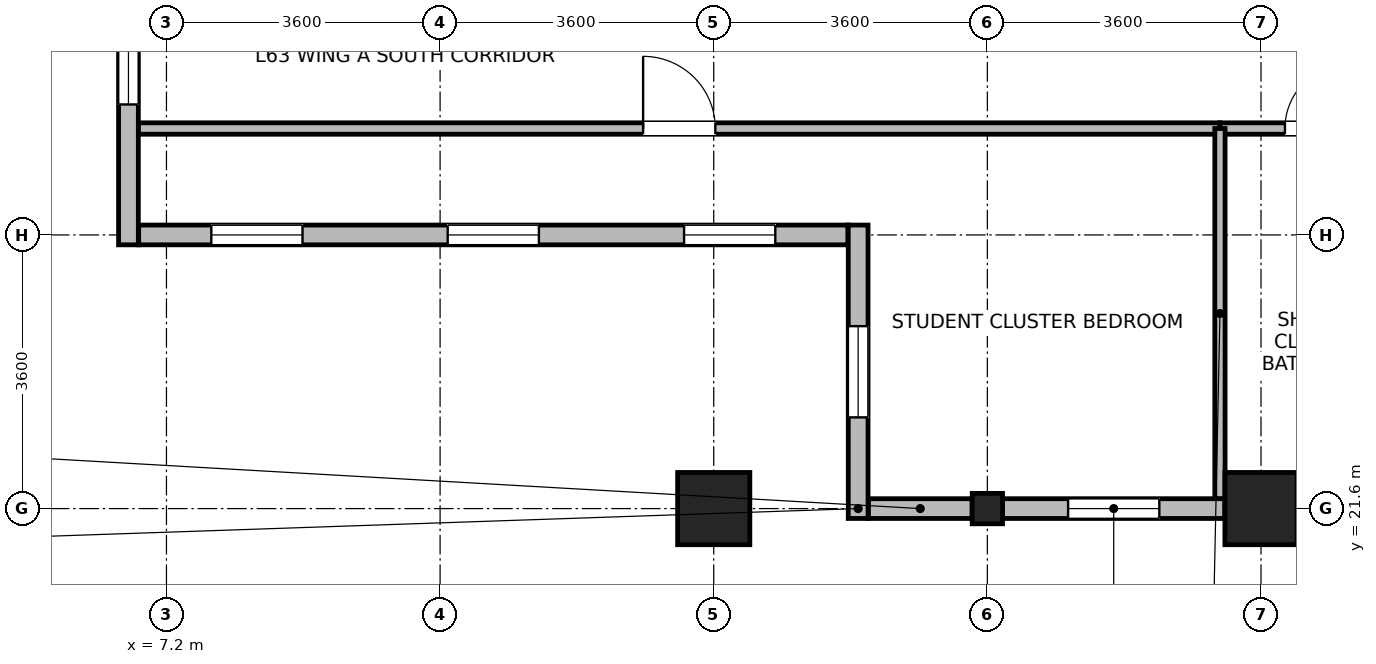
"""IFC4 building model, lengths in metres.
Left out: names, types, materials, properties, quantities, classifications, styles, units other than length and angle.
Written with IfcOpenShell. Run it as: python <this file> out.ifc"""

import sys

from ifc_helpers import new_model, si_unit, direction, frame, frame_2d, origin, origin_2d, place, context, subcontext, project, spatial, rectangle, i_section, extrude, source, transform, mapped, element, fill, save


model = new_model("IFC4")
c1 = context("Model", 3, precision=1e-05, world=origin(), true_north=direction((0.0, 1.0)))
c2 = subcontext(c1, "Body", "Model", "MODEL_VIEW")
j1 = project(units=[si_unit("LENGTHUNIT", "METRE"), si_unit("PLANEANGLEUNIT", "RADIAN")], contexts=[c1])
p1 = place(None, origin())
s1 = spatial("IfcSite", under=j1, at=p1, CompositionType="ELEMENT")
p2 = place(p1, origin())
s2 = spatial("IfcBuilding", under=s1, at=p2, CompositionType="ELEMENT")
p3 = place(p2, frame((0.0, 0.0, 246.2)))
s3 = spatial("IfcBuildingStorey", under=s2, at=p3, CompositionType="ELEMENT", Elevation=246.2)
m1 = source(origin(), c2, "Body", "SweptSolid", [
    extrude(rectangle(XDim=0.95, YDim=0.95, at=origin_2d()), origin(), (0.0, 0.0, 1.0), 3.7),
])
for number, where, z_axis, x_axis in (
    (1, (14.4, 21.6, 0.0), (0.0, 0.0, 1.0), (1.0, 0.0, 0.0)),
    (2, (21.6, 21.6, 0.0), (0.0, 0.0, 1.0), (1.0, 0.0, 0.0)),
):
    element("IfcColumn", number, at=place(p3, frame(where, z_axis=z_axis, x_axis=x_axis)), inside=s3, PredefinedType="COLUMN", context=c2, shape_type="MappedRepresentation", body=[
        mapped(m1, transform((0.0, 0.0, 0.0), x_axis=(1.0, 0.0, 0.0), y_axis=(0.0, 1.0, 0.0), z_axis=(0.0, 0.0, 1.0), scale=1.0)),
    ])
m2 = source(origin(), c2, "Body", "SweptSolid", [
    extrude(i_section(OverallWidth=0.399, OverallDepth=0.4, WebThickness=0.017, FlangeThickness=0.023, FilletRadius=0.015, at=origin_2d()), origin(), (0.0, 0.0, 1.0), 3.7),
])
p4 = place(p3, frame((18.0, 21.6, 0.0), z_axis=(0.0, 0.0, 1.0), x_axis=(1.0, 0.0, 0.0)))
e3 = element("IfcColumn", 3, at=p4, inside=s3, PredefinedType="COLUMN", context=c2, shape_type="MappedRepresentation", body=[
    mapped(m2, transform((0.0, 0.0, 0.0), x_axis=(1.0, 0.0, 0.0), y_axis=(0.0, 1.0, 0.0), z_axis=(0.0, 0.0, 1.0), scale=1.0)),
])
p5 = place(p3, frame((17.8, 21.6, 0.0), z_axis=(0.0, 0.0, 1.0), x_axis=(-1.0, 0.0, 0.0)))
e4 = element("IfcWall", 4, at=p5, inside=s3, PredefinedType="STANDARD", context=c2, shape_type="SweptSolid", body=[
    extrude(rectangle(XDim=1.365, YDim=0.26, at=frame_2d((0.682, 0.0))), origin(), (0.0, 0.0, 1.0), 2.86),
])
p6 = place(p3, frame((21.124, 21.6, 0.0), z_axis=(0.0, 0.0, 1.0), x_axis=(-1.0, 0.0, 0.0)))
e5 = element("IfcWall", 5, at=p6, inside=s3, PredefinedType="STANDARD", context=c2, shape_type="SweptSolid", body=[
    extrude(rectangle(XDim=2.924, YDim=0.26, at=frame_2d((1.462, 0.0))), origin(), (0.0, 0.0, 1.0), 2.86),
])
p7 = place(p6, frame((0.862, 0.0, 0.85)))
e6 = element("IfcOpeningElement", 6, at=p7, cuts=e5, PredefinedType="OPENING", context=c2, shape_type="SweptSolid", body=[
    extrude(rectangle(XDim=1.2, YDim=1.75, at=frame_2d((0.6, 0.875))), frame((0.0, 0.14, 0.0), z_axis=(0.0, -1.0, 0.0), x_axis=(1.0, 0.0, 0.0)), (0.0, 0.0, 1.0), 0.28),
])
p8 = place(p3, frame((6.7, 25.07, 0.0), z_axis=(0.0, 0.0, 1.0), x_axis=(0.0, 1.0, 0.0)))
e7 = element("IfcWall", 7, at=p8, inside=s3, PredefinedType="STANDARD", context=c2, shape_type="SweptSolid", body=[
    extrude(rectangle(XDim=3.104, YDim=0.26, at=frame_2d((1.552, 0.0))), origin(), (0.0, 0.0, 1.0), 3.26),
])
p9 = place(p8, frame((1.847, 0.0, 0.85)))
e8 = element("IfcOpeningElement", 8, at=p9, cuts=e7, PredefinedType="OPENING", context=c2, shape_type="SweptSolid", body=[
    extrude(rectangle(XDim=0.95, YDim=1.75, at=frame_2d((0.475, 0.875))), frame((0.0, 0.14, 0.0), z_axis=(0.0, -1.0, 0.0), x_axis=(1.0, 0.0, 0.0)), (0.0, 0.0, 1.0), 0.28),
])
p10 = place(p3, frame((16.165, 25.2, 0.0), z_axis=(0.0, 0.0, 1.0), x_axis=(-1.0, 0.0, 0.0)))
e9 = element("IfcWall", 9, at=p10, inside=s3, PredefinedType="STANDARD", context=c2, shape_type="SweptSolid", body=[
    extrude(rectangle(XDim=9.33, YDim=0.26, at=frame_2d((4.665, 0.0))), origin(), (0.0, 0.0, 1.0), 3.26),
])
p11 = place(p10, frame((0.955, 0.0, 0.85)))
e10 = element("IfcOpeningElement", 10, at=p11, cuts=e9, PredefinedType="OPENING", context=c2, shape_type="SweptSolid", body=[
    extrude(rectangle(XDim=1.2, YDim=1.75, at=frame_2d((0.6, 0.875))), frame((0.0, 0.14, 0.0), z_axis=(0.0, -1.0, 0.0), x_axis=(1.0, 0.0, 0.0)), (0.0, 0.0, 1.0), 0.28),
])
p12 = place(p10, frame((4.065, 0.0, 0.85)))
e11 = element("IfcOpeningElement", 11, at=p12, cuts=e9, PredefinedType="OPENING", context=c2, shape_type="SweptSolid", body=[
    extrude(rectangle(XDim=1.2, YDim=1.75, at=frame_2d((0.6, 0.875))), frame((0.0, 0.14, 0.0), z_axis=(0.0, -1.0, 0.0), x_axis=(1.0, 0.0, 0.0)), (0.0, 0.0, 1.0), 0.28),
])
p13 = place(p10, frame((7.175, 0.0, 0.85)))
e12 = element("IfcOpeningElement", 12, at=p13, cuts=e9, PredefinedType="OPENING", context=c2, shape_type="SweptSolid", body=[
    extrude(rectangle(XDim=1.2, YDim=1.75, at=frame_2d((0.6, 0.875))), frame((0.0, 0.14, 0.0), z_axis=(0.0, -1.0, 0.0), x_axis=(1.0, 0.0, 0.0)), (0.0, 0.0, 1.0), 0.28),
])
p14 = place(p3, frame((16.3, 21.47, 0.0), z_axis=(0.0, 0.0, 1.0), x_axis=(0.0, 1.0, 0.0)))
e13 = element("IfcWall", 13, at=p14, inside=s3, PredefinedType="STANDARD", context=c2, shape_type="SweptSolid", body=[
    extrude(rectangle(XDim=3.86, YDim=0.26, at=frame_2d((1.93, 0.0))), origin(), (0.0, 0.0, 1.0), 3.26),
])
p15 = place(p14, frame((1.33, 0.0, 0.85)))
e14 = element("IfcOpeningElement", 14, at=p15, cuts=e13, PredefinedType="OPENING", context=c2, shape_type="SweptSolid", body=[
    extrude(rectangle(XDim=1.2, YDim=1.75, at=frame_2d((0.6, 0.875))), frame((0.0, 0.14, 0.0), z_axis=(0.0, -1.0, 0.0), x_axis=(1.0, 0.0, 0.0)), (0.0, 0.0, 1.0), 0.28),
])
p16 = place(p3, frame((6.832, 26.6, 0.0), z_axis=(0.0, 0.0, 1.0), x_axis=(1.0, 0.0, 0.0)))
e15 = element("IfcWall", 15, at=p16, inside=s3, PredefinedType="PARTITIONING", context=c2, shape_type="SweptSolid", body=[
    extrude(rectangle(XDim=14.228, YDim=0.15, at=frame_2d((7.114, 0.0))), origin(), (0.0, 0.0, 1.0), 3.26),
])
p17 = place(p16, frame((6.639, 0.0, 0.0)))
e16 = element("IfcOpeningElement", 16, at=p17, cuts=e15, PredefinedType="OPENING", context=c2, shape_type="SweptSolid", body=[
    extrude(rectangle(XDim=0.95, YDim=2.1, at=frame_2d((0.475, 1.05))), frame((0.0, 0.085, 0.0), z_axis=(0.0, -1.0, 0.0), x_axis=(1.0, 0.0, 0.0)), (0.0, 0.0, 1.0), 0.17),
])
p18 = place(p3, frame((21.06, 26.6, 0.0), z_axis=(0.0, 0.0, 1.0), x_axis=(1.0, 0.0, 0.0)))
e17 = element("IfcWall", 17, at=p18, inside=s3, PredefinedType="PARTITIONING", context=c2, shape_type="SweptSolid", body=[
    extrude(rectangle(XDim=2.56, YDim=0.15, at=frame_2d((1.28, 0.0))), origin(), (0.0, 0.0, 1.0), 3.26),
])
p19 = place(p18, frame((0.855, 0.0, 0.0)))
e18 = element("IfcOpeningElement", 18, at=p19, cuts=e17, PredefinedType="OPENING", context=c2, shape_type="SweptSolid", body=[
    extrude(rectangle(XDim=0.85, YDim=2.04, at=frame_2d((0.425, 1.02))), frame((0.0, 0.085, 0.0), z_axis=(0.0, -1.0, 0.0), x_axis=(1.0, 0.0, 0.0)), (0.0, 0.0, 1.0), 0.17),
])
p20 = place(p3, frame((21.06, 21.732, 0.0), z_axis=(0.0, 0.0, 1.0), x_axis=(0.0, 1.0, 0.0)))
e19 = element("IfcWall", 19, at=p20, inside=s3, PredefinedType="PARTITIONING", context=c2, shape_type="SweptSolid", body=[
    extrude(rectangle(XDim=4.868, YDim=0.135, at=frame_2d((2.434, 0.0))), origin(), (0.0, 0.0, 1.0), 3.26),
])
p21 = place(p7, origin())
e20 = element("IfcWindow", 20, at=p21, inside=s3, PartitioningType="SINGLE_PANEL", PredefinedType="WINDOW", context=c2, shape_type="SweptSolid", body=[
    extrude(rectangle(XDim=1.2, YDim=1.75, at=frame_2d((0.6, 0.875))), frame((0.0, 0.03, 0.0), z_axis=(0.0, -1.0, 0.0), x_axis=(1.0, 0.0, 0.0)), (0.0, 0.0, 1.0), 0.06),
])
fill(e6, e20)
p22 = place(p9, origin())
e21 = element("IfcWindow", 21, at=p22, inside=s3, PartitioningType="SINGLE_PANEL", PredefinedType="WINDOW", context=c2, shape_type="SweptSolid", body=[
    extrude(rectangle(XDim=0.95, YDim=1.75, at=frame_2d((0.475, 0.875))), frame((0.0, 0.03, 0.0), z_axis=(0.0, -1.0, 0.0), x_axis=(1.0, 0.0, 0.0)), (0.0, 0.0, 1.0), 0.06),
])
fill(e8, e21)
p23 = place(p11, origin())
e22 = element("IfcWindow", 22, at=p23, inside=s3, PartitioningType="SINGLE_PANEL", PredefinedType="WINDOW", context=c2, shape_type="SweptSolid", body=[
    extrude(rectangle(XDim=1.2, YDim=1.75, at=frame_2d((0.6, 0.875))), frame((0.0, 0.03, 0.0), z_axis=(0.0, -1.0, 0.0), x_axis=(1.0, 0.0, 0.0)), (0.0, 0.0, 1.0), 0.06),
])
fill(e10, e22)
p24 = place(p12, origin())
e23 = element("IfcWindow", 23, at=p24, inside=s3, PartitioningType="SINGLE_PANEL", PredefinedType="WINDOW", context=c2, shape_type="SweptSolid", body=[
    extrude(rectangle(XDim=1.2, YDim=1.75, at=frame_2d((0.6, 0.875))), frame((0.0, 0.03, 0.0), z_axis=(0.0, -1.0, 0.0), x_axis=(1.0, 0.0, 0.0)), (0.0, 0.0, 1.0), 0.06),
])
fill(e11, e23)
p25 = place(p13, origin())
e24 = element("IfcWindow", 24, at=p25, inside=s3, PartitioningType="SINGLE_PANEL", PredefinedType="WINDOW", context=c2, shape_type="SweptSolid", body=[
    extrude(rectangle(XDim=1.2, YDim=1.75, at=frame_2d((0.6, 0.875))), frame((0.0, 0.03, 0.0), z_axis=(0.0, -1.0, 0.0), x_axis=(1.0, 0.0, 0.0)), (0.0, 0.0, 1.0), 0.06),
])
fill(e12, e24)
p26 = place(p15, origin())
e25 = element("IfcWindow", 25, at=p26, inside=s3, PartitioningType="SINGLE_PANEL", PredefinedType="WINDOW", context=c2, shape_type="SweptSolid", body=[
    extrude(rectangle(XDim=1.2, YDim=1.75, at=frame_2d((0.6, 0.875))), frame((0.0, 0.03, 0.0), z_axis=(0.0, -1.0, 0.0), x_axis=(1.0, 0.0, 0.0)), (0.0, 0.0, 1.0), 0.06),
])
fill(e14, e25)
p27 = place(p17, origin())
e26 = element("IfcDoor", 26, at=p27, inside=s3, OperationType="SINGLE_SWING_LEFT", PredefinedType="DOOR", context=c2, shape_type="SweptSolid", body=[
    extrude(rectangle(XDim=0.95, YDim=2.1, at=frame_2d((0.475, 1.05))), frame((0.0, 0.025, 0.0), z_axis=(0.0, -1.0, 0.0), x_axis=(1.0, 0.0, 0.0)), (0.0, 0.0, 1.0), 0.05),
])
fill(e16, e26)
p28 = place(p19, origin())
e27 = element("IfcDoor", 27, at=p28, inside=s3, OperationType="SINGLE_SWING_RIGHT", PredefinedType="DOOR", context=c2, shape_type="SweptSolid", body=[
    extrude(rectangle(XDim=0.85, YDim=2.04, at=frame_2d((0.425, 1.02))), frame((0.0, 0.025, 0.0), z_axis=(0.0, -1.0, 0.0), x_axis=(1.0, 0.0, 0.0)), (0.0, 0.0, 1.0), 0.05),
])
fill(e18, e27)
save(model, sys.argv[1])
